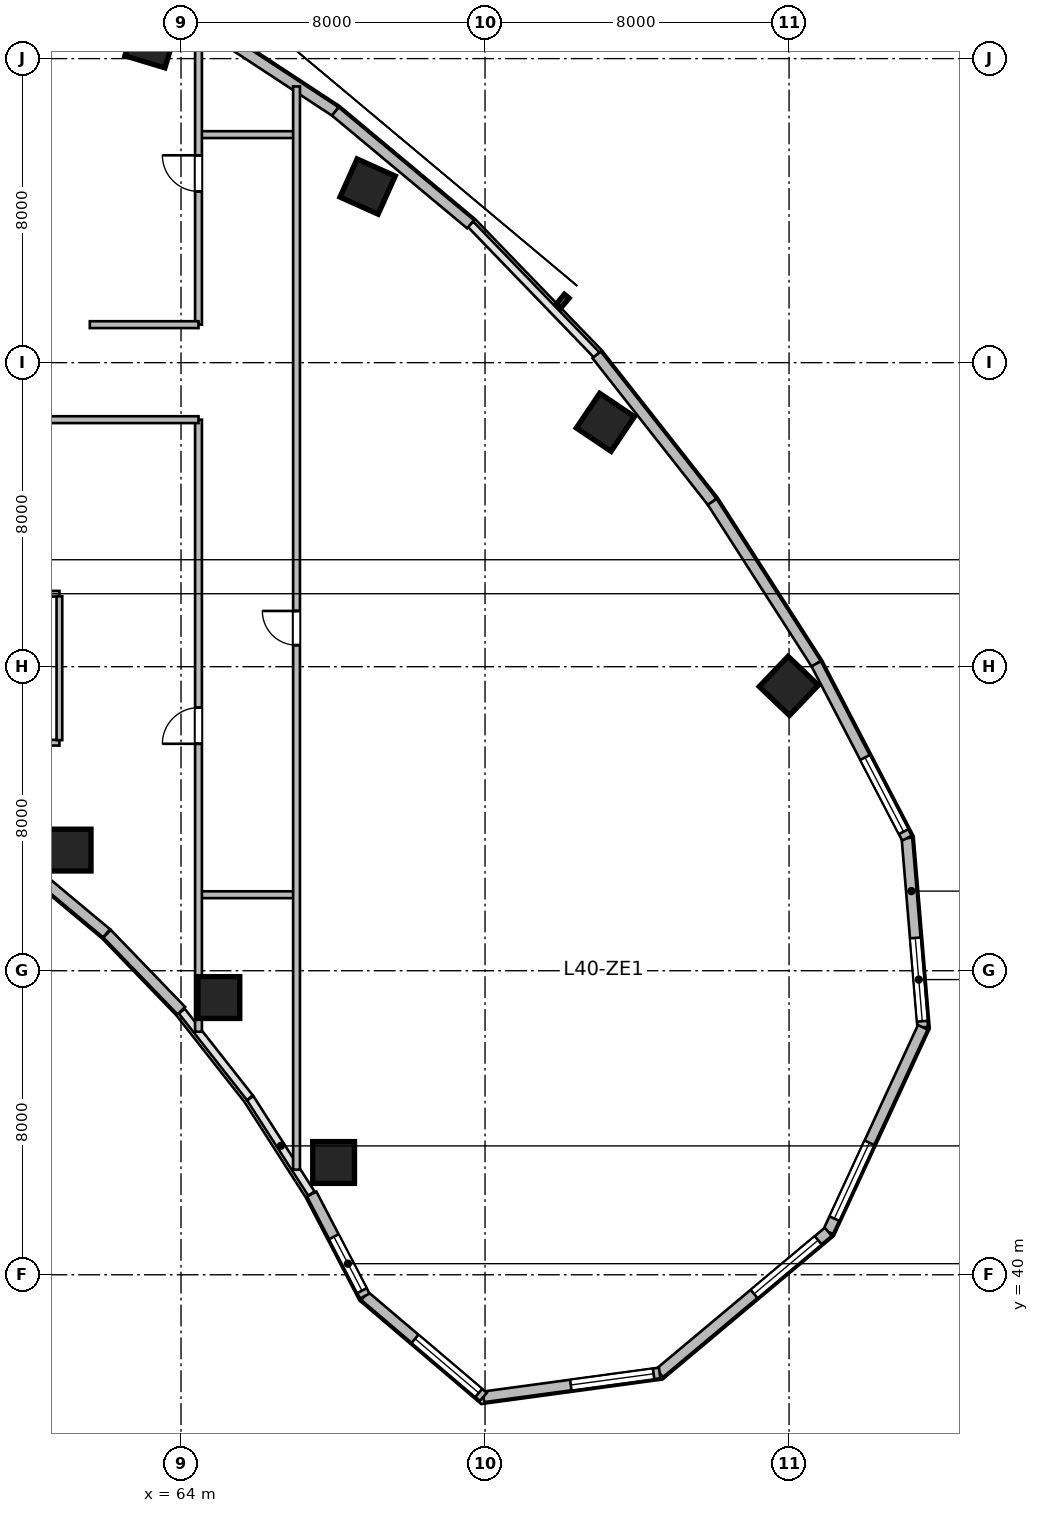
"""IFC4 building model, lengths in metres.
Left out: names, types, materials, properties, quantities, classifications, styles, units other than length and angle.
Written with IfcOpenShell. Run it as: python <this file> out.ifc"""

import sys

from ifc_helpers import new_model, si_unit, direction, frame, frame_2d, origin, origin_2d, place, context, subcontext, project, spatial, rectangle, circle, extrude, source, transform, mapped, element, fill, save


model = new_model("IFC4")
c1 = context("Model", 3, precision=1e-05, world=origin(), true_north=direction((0.0, 1.0)))
c2 = subcontext(c1, "Body", "Model", "MODEL_VIEW")
j1 = project(units=[si_unit("LENGTHUNIT", "METRE"), si_unit("PLANEANGLEUNIT", "RADIAN")], contexts=[c1])
p1 = place(None, origin())
s1 = spatial("IfcSite", under=j1, at=p1, CompositionType="ELEMENT")
p2 = place(p1, origin())
s2 = spatial("IfcBuilding", under=s1, at=p2, CompositionType="ELEMENT")
p3 = place(p2, frame((0.0, 0.0, 166.2)))
s3 = spatial("IfcBuildingStorey", under=s2, at=p3, CompositionType="ELEMENT", Elevation=166.2)
m1 = source(origin(), c2, "Body", "SweptSolid", [
    extrude(rectangle(XDim=1.1, YDim=1.1, at=origin_2d()), origin(), (0.0, 0.0, 1.0), 3.9),
])
p4 = place(p3, frame((63.209, 72.442, 0.0), z_axis=(0.0, 0.0, 1.0), x_axis=(0.288697611798, 0.957420330337, 0.0)))
e1 = element("IfcColumn", 1, at=p4, inside=s3, PredefinedType="COLUMN", context=c2, shape_type="MappedRepresentation", body=[
    mapped(m1, transform((0.0, 0.0, 0.0), scale=1.0)),
])
m2 = source(origin(), c2, "Body", "SweptSolid", [
    extrude(circle(Radius=0.55, at=origin_2d()), origin(), (0.0, 0.0, 1.0), 3.9),
])
p5 = place(p3, frame((61.082, 51.175, 0.0), z_axis=(0.0, 0.0, 1.0), x_axis=(0.409126902895, 0.912477494148, 0.0)))
e2 = element("IfcColumn", 2, at=p5, inside=s3, PredefinedType="COLUMN", context=c2, shape_type="MappedRepresentation", body=[
    mapped(m2, transform((0.0, 0.0, 0.0), scale=1.0)),
])
p6 = place(p3, frame((68.91, 68.633, 0.0), z_axis=(0.0, 0.0, 1.0), x_axis=(0.409126902895, 0.912477494148, 0.0)))
e3 = element("IfcColumn", 3, at=p6, inside=s3, PredefinedType="COLUMN", context=c2, shape_type="MappedRepresentation", body=[
    mapped(m1, transform((0.0, 0.0, 0.0), scale=1.0)),
])
p7 = place(p3, frame((64.996, 47.294, 0.0), z_axis=(0.0, 0.0, 1.0), x_axis=(0.55774510898, 0.830012285095, 0.0)))
e4 = element("IfcColumn", 4, at=p7, inside=s3, PredefinedType="COLUMN", context=c2, shape_type="MappedRepresentation", body=[
    mapped(m2, transform((0.0, 0.0, 0.0), scale=1.0)),
])
p8 = place(p3, frame((75.167, 62.43, 0.0), z_axis=(0.0, 0.0, 1.0), x_axis=(0.55774510898, 0.830012285095, 0.0)))
e5 = element("IfcColumn", 5, at=p8, inside=s3, PredefinedType="COLUMN", context=c2, shape_type="MappedRepresentation", body=[
    mapped(m1, transform((0.0, 0.0, 0.0), scale=1.0)),
])
p9 = place(p3, frame((68.015, 42.955, 0.0), z_axis=(0.0, 0.0, 1.0), x_axis=(0.690756218984, 0.723087716626, 0.0)))
e6 = element("IfcColumn", 6, at=p9, inside=s3, PredefinedType="COLUMN", context=c2, shape_type="MappedRepresentation", body=[
    mapped(m2, transform((0.0, 0.0, 0.0), scale=1.0)),
])
p10 = place(p3, frame((79.993, 55.494, 0.0), z_axis=(0.0, 0.0, 1.0), x_axis=(0.690756218984, 0.723087716626, 0.0)))
e7 = element("IfcColumn", 7, at=p10, inside=s3, PredefinedType="COLUMN", context=c2, shape_type="MappedRepresentation", body=[
    mapped(m1, transform((0.0, 0.0, 0.0), scale=1.0)),
])
m3 = source(origin(), c2, "Body", "SweptSolid", [
    extrude(rectangle(XDim=4.994, YDim=0.28, at=frame_2d((2.497, 0.0))), origin(), (0.0, 0.0, 1.0), 3.65),
])
p11 = place(p3, frame((83.102, 51.489, 0.0), z_axis=(0.0, 0.0, 1.0), x_axis=(0.083344839916, -0.996520766296, 0.0)))
e8 = element("IfcWall", 8, at=p11, inside=s3, PredefinedType="SOLIDWALL", context=c2, shape_type="MappedRepresentation", body=[
    mapped(m3, transform((0.0, 0.0, 0.0), scale=1.0)),
])
p12 = place(p11, frame((2.635, 0.0, 0.95)))
e9 = element("IfcOpeningElement", 9, at=p12, cuts=e8, PredefinedType="OPENING", context=c2, shape_type="SweptSolid", body=[
    extrude(rectangle(XDim=2.2, YDim=2.1, at=frame_2d((1.1, 1.05))), frame((0.0, 0.15, 0.0), z_axis=(0.0, -1.0, 0.0), x_axis=(1.0, 0.0, 0.0)), (0.0, 0.0, 1.0), 0.3),
])
m4 = source(origin(), c2, "Body", "SweptSolid", [
    extrude(rectangle(XDim=5.927, YDim=0.28, at=frame_2d((2.964, 0.0))), origin(), (0.0, 0.0, 1.0), 3.65),
])
p13 = place(p3, frame((83.519, 46.512, 0.0), z_axis=(0.0, 0.0, 1.0), x_axis=(-0.419656204795, -0.907683132914, 0.0)))
e10 = element("IfcWall", 10, at=p13, inside=s3, PredefinedType="SOLIDWALL", context=c2, shape_type="MappedRepresentation", body=[
    mapped(m4, transform((0.0, 0.0, 0.0), scale=1.0)),
])
p14 = place(p13, frame((3.346, 0.0, 0.95)))
e11 = element("IfcOpeningElement", 11, at=p14, cuts=e10, PredefinedType="OPENING", context=c2, shape_type="SweptSolid", body=[
    extrude(rectangle(XDim=2.2, YDim=2.1, at=frame_2d((1.1, 1.05))), frame((0.0, 0.15, 0.0), z_axis=(0.0, -1.0, 0.0), x_axis=(1.0, 0.0, 0.0)), (0.0, 0.0, 1.0), 0.3),
])
m5 = source(origin(), c2, "Body", "SweptSolid", [
    extrude(rectangle(XDim=5.786, YDim=0.28, at=frame_2d((2.893, 0.0))), origin(), (0.0, 0.0, 1.0), 3.65),
])
p15 = place(p3, frame((81.031, 41.131, 0.0), z_axis=(0.0, 0.0, 1.0), x_axis=(-0.766711306852, -0.641992034176, 0.0)))
e12 = element("IfcWall", 12, at=p15, inside=s3, PredefinedType="SOLIDWALL", context=c2, shape_type="MappedRepresentation", body=[
    mapped(m5, transform((0.0, 0.0, 0.0), scale=1.0)),
])
p16 = place(p15, frame((0.347, 0.0, 0.95)))
e13 = element("IfcOpeningElement", 13, at=p16, cuts=e12, PredefinedType="OPENING", context=c2, shape_type="SweptSolid", body=[
    extrude(rectangle(XDim=2.2, YDim=2.1, at=frame_2d((1.1, 1.05))), frame((0.0, 0.15, 0.0), z_axis=(0.0, -1.0, 0.0), x_axis=(1.0, 0.0, 0.0)), (0.0, 0.0, 1.0), 0.3),
])
m6 = source(origin(), c2, "Body", "SweptSolid", [
    extrude(rectangle(XDim=4.68, YDim=0.28, at=frame_2d((2.34, 0.0))), origin(), (0.0, 0.0, 1.0), 3.65),
])
p17 = place(p3, frame((76.594, 37.417, 0.0), z_axis=(0.0, 0.0, 1.0), x_axis=(-0.990931146435, -0.134370618162, 0.0)))
e14 = element("IfcWall", 14, at=p17, inside=s3, PredefinedType="SOLIDWALL", context=c2, shape_type="MappedRepresentation", body=[
    mapped(m6, transform((0.0, 0.0, 0.0), scale=1.0)),
])
p18 = place(p17, frame((0.16, 0.0, 0.95)))
e15 = element("IfcOpeningElement", 15, at=p18, cuts=e14, PredefinedType="OPENING", context=c2, shape_type="SweptSolid", body=[
    extrude(rectangle(XDim=2.2, YDim=2.1, at=frame_2d((1.1, 1.05))), frame((0.0, 0.15, 0.0), z_axis=(0.0, -1.0, 0.0), x_axis=(1.0, 0.0, 0.0)), (0.0, 0.0, 1.0), 0.3),
])
m7 = source(origin(), c2, "Body", "SweptSolid", [
    extrude(rectangle(XDim=4.096, YDim=0.28, at=frame_2d((2.048, 0.0))), origin(), (0.0, 0.0, 1.0), 3.65),
])
p19 = place(p3, frame((71.957, 36.788, 0.0), z_axis=(0.0, 0.0, 1.0), x_axis=(-0.761926081737, 0.647663991564, 0.0)))
e16 = element("IfcWall", 16, at=p19, inside=s3, PredefinedType="SOLIDWALL", context=c2, shape_type="MappedRepresentation", body=[
    mapped(m7, transform((0.0, 0.0, 0.0), scale=1.0)),
])
p20 = place(p19, frame((0.16, 0.0, 0.95)))
e17 = element("IfcOpeningElement", 17, at=p20, cuts=e16, PredefinedType="OPENING", context=c2, shape_type="SweptSolid", body=[
    extrude(rectangle(XDim=2.2, YDim=2.1, at=frame_2d((1.1, 1.05))), frame((0.0, 0.15, 0.0), z_axis=(0.0, -1.0, 0.0), x_axis=(1.0, 0.0, 0.0)), (0.0, 0.0, 1.0), 0.3),
])
m8 = source(origin(), c2, "Body", "SweptSolid", [
    extrude(rectangle(XDim=3.024, YDim=0.28, at=frame_2d((1.512, 0.0))), origin(), (0.0, 0.0, 1.0), 3.65),
])
p21 = place(p3, frame((68.836, 39.44, 0.0), z_axis=(0.0, 0.0, 1.0), x_axis=(-0.461718746531, 0.887026380161, 0.0)))
e18 = element("IfcWall", 18, at=p21, inside=s3, PredefinedType="SOLIDWALL", context=c2, shape_type="MappedRepresentation", body=[
    mapped(m8, transform((0.0, 0.0, 0.0), scale=1.0)),
])
p22 = place(p21, frame((0.16, 0.0, 0.95)))
e19 = element("IfcOpeningElement", 19, at=p22, cuts=e18, PredefinedType="OPENING", context=c2, shape_type="SweptSolid", body=[
    extrude(rectangle(XDim=1.6, YDim=1.9, at=frame_2d((0.8, 0.95))), frame((0.0, 0.15, 0.0), z_axis=(0.0, -1.0, 0.0), x_axis=(1.0, 0.0, 0.0)), (0.0, 0.0, 1.0), 0.3),
])
m9 = source(origin(), c2, "Body", "SweptSolid", [
    extrude(rectangle(XDim=2.812, YDim=0.28, at=frame_2d((1.406, 0.0))), origin(), (0.0, 0.0, 1.0), 3.65),
])
p23 = place(p3, frame((64.008, 46.95, 0.0), z_axis=(0.0, 0.0, 1.0), x_axis=(-0.694583668785, 0.719411931411, 0.0)))
e20 = element("IfcWall", 20, at=p23, inside=s3, PredefinedType="SOLIDWALL", context=c2, shape_type="MappedRepresentation", body=[
    mapped(m9, transform((0.0, 0.0, 0.0), scale=1.0)),
])
m10 = source(origin(), c2, "Body", "SweptSolid", [
    extrude(rectangle(XDim=2.729, YDim=0.28, at=frame_2d((1.365, 0.0))), origin(), (0.0, 0.0, 1.0), 3.65),
])
p24 = place(p3, frame((62.041, 48.987, 0.0), z_axis=(0.0, 0.0, 1.0), x_axis=(-0.767957284255, 0.640501061326, 0.0)))
e21 = element("IfcWall", 21, at=p24, inside=s3, PredefinedType="SOLIDWALL", context=c2, shape_type="MappedRepresentation", body=[
    mapped(m10, transform((0.0, 0.0, 0.0), scale=1.0)),
])
m11 = source(origin(), c2, "Body", "SweptSolid", [
    extrude(rectangle(XDim=4.501, YDim=0.28, at=frame_2d((2.25, 0.0))), origin(), (0.0, 0.0, 1.0), 3.65),
])
p25 = place(p3, frame((64.298, 73.08, 0.0), z_axis=(0.0, 0.0, 1.0), x_axis=(0.835984920737, -0.548752414391, 0.0)))
e22 = element("IfcWall", 22, at=p25, inside=s3, PredefinedType="SOLIDWALL", context=c2, shape_type="MappedRepresentation", body=[
    mapped(m11, transform((0.0, 0.0, 0.0), scale=1.0)),
])
m12 = source(origin(), c2, "Body", "SweptSolid", [
    extrude(rectangle(XDim=4.634, YDim=0.28, at=frame_2d((2.317, 0.0))), origin(), (0.0, 0.0, 1.0), 3.65),
])
p26 = place(p3, frame((68.061, 70.61, 0.0), z_axis=(0.0, 0.0, 1.0), x_axis=(0.767910229096, -0.640557475993, 0.0)))
e23 = element("IfcWall", 23, at=p26, inside=s3, PredefinedType="SOLIDWALL", context=c2, shape_type="MappedRepresentation", body=[
    mapped(m12, transform((0.0, 0.0, 0.0), scale=1.0)),
])
m13 = source(origin(), c2, "Body", "SweptSolid", [
    extrude(rectangle(XDim=4.922, YDim=0.28, at=frame_2d((2.461, 0.0))), origin(), (0.0, 0.0, 1.0), 3.65),
])
p27 = place(p3, frame((74.936, 64.206, 0.0), z_axis=(0.0, 0.0, 1.0), x_axis=(0.61817639101, -0.786039407153, 0.0)))
e24 = element("IfcWall", 24, at=p27, inside=s3, PredefinedType="SOLIDWALL", context=c2, shape_type="MappedRepresentation", body=[
    mapped(m13, transform((0.0, 0.0, 0.0), scale=1.0)),
])
m14 = source(origin(), c2, "Body", "SweptSolid", [
    extrude(rectangle(XDim=5.065, YDim=0.28, at=frame_2d((2.532, 0.0))), origin(), (0.0, 0.0, 1.0), 3.65),
])
p28 = place(p3, frame((77.979, 60.338, 0.0), z_axis=(0.0, 0.0, 1.0), x_axis=(0.540177618806, -0.841551032404, 0.0)))
e25 = element("IfcWall", 25, at=p28, inside=s3, PredefinedType="SOLIDWALL", context=c2, shape_type="MappedRepresentation", body=[
    mapped(m14, transform((0.0, 0.0, 0.0), scale=1.0)),
])
m15 = source(origin(), c2, "Body", "SweptSolid", [
    extrude(rectangle(XDim=5.171, YDim=0.28, at=frame_2d((2.585, 0.0))), origin(), (0.0, 0.0, 1.0), 3.65),
])
p29 = place(p3, frame((80.715, 56.075, 0.0), z_axis=(0.0, 0.0, 1.0), x_axis=(0.461752581363, -0.887008767491, 0.0)))
e26 = element("IfcWall", 26, at=p29, inside=s3, PredefinedType="SOLIDWALL", context=c2, shape_type="MappedRepresentation", body=[
    mapped(m15, transform((0.0, 0.0, 0.0), scale=1.0)),
])
p30 = place(p29, frame((2.778, 0.0, 0.95)))
e27 = element("IfcOpeningElement", 27, at=p30, cuts=e26, PredefinedType="OPENING", context=c2, shape_type="SweptSolid", body=[
    extrude(rectangle(XDim=2.2, YDim=2.1, at=frame_2d((1.1, 1.05))), frame((0.0, 0.15, 0.0), z_axis=(0.0, -1.0, 0.0), x_axis=(1.0, 0.0, 0.0)), (0.0, 0.0, 1.0), 0.3),
])
m16 = source(origin(), c2, "Body", "SweptSolid", [
    extrude(rectangle(XDim=6.6, YDim=0.15, at=frame_2d((3.3, 0.0))), origin(), (0.0, 0.0, 1.0), 3.095),
])
p31 = place(p3, frame((54.2, 54.0, 0.0), z_axis=(0.0, 0.0, 1.0), x_axis=(1.0, 0.0, 0.0)))
e28 = element("IfcWall", 28, at=p31, inside=s3, PredefinedType="PARTITIONING", context=c2, shape_type="MappedRepresentation", body=[
    mapped(m16, transform((0.0, 0.0, 0.0), scale=1.0)),
])
m17 = source(origin(), c2, "Body", "SweptSolid", [
    extrude(rectangle(XDim=6.6, YDim=0.15, at=frame_2d((3.3, 0.0))), origin(), (0.0, 0.0, 1.0), 3.65),
])
p32 = place(p3, frame((54.2, 57.92, 0.0), z_axis=(0.0, 0.0, 1.0), x_axis=(1.0, 0.0, 0.0)))
e29 = element("IfcWall", 29, at=p32, inside=s3, PredefinedType="PARTITIONING", context=c2, shape_type="MappedRepresentation", body=[
    mapped(m17, transform((0.0, 0.0, 0.0), scale=1.0)),
])
p33 = place(p32, frame((2.825, 0.0, 0.0)))
e30 = element("IfcOpeningElement", 30, at=p33, cuts=e29, PredefinedType="OPENING", context=c2, shape_type="SweptSolid", body=[
    extrude(rectangle(XDim=0.95, YDim=2.1, at=frame_2d((0.475, 1.05))), frame((0.0, 0.085, 0.0), z_axis=(0.0, -1.0, 0.0), x_axis=(1.0, 0.0, 0.0)), (0.0, 0.0, 1.0), 0.17),
])
m18 = source(origin(), c2, "Body", "SweptSolid", [
    extrude(rectangle(XDim=3.785, YDim=0.15, at=frame_2d((1.893, 0.0))), origin(), (0.0, 0.0, 1.0), 3.65),
])
p34 = place(p3, frame((60.8, 54.067, 0.0), z_axis=(0.0, 0.0, 1.0), x_axis=(0.0, 1.0, 0.0)))
e31 = element("IfcWall", 31, at=p34, inside=s3, PredefinedType="PARTITIONING", context=c2, shape_type="MappedRepresentation", body=[
    mapped(m18, transform((0.0, 0.0, 0.0), scale=1.0)),
])
m19 = source(origin(), c2, "Body", "SweptSolid", [
    extrude(rectangle(XDim=2.5, YDim=0.18, at=frame_2d((1.25, 0.0))), origin(), (0.0, 0.0, 1.0), 3.65),
])
p35 = place(p3, frame((64.5, 50.0, 0.0), z_axis=(0.0, 0.0, 1.0), x_axis=(1.0, 0.0, 0.0)))
e32 = element("IfcWall", 32, at=p35, inside=s3, PredefinedType="PLUMBINGWALL", context=c2, shape_type="MappedRepresentation", body=[
    mapped(m19, transform((0.0, 0.0, 0.0), scale=1.0)),
])
m20 = source(origin(), c2, "Body", "SweptSolid", [
    extrude(rectangle(XDim=2.5, YDim=0.18, at=frame_2d((1.25, 0.0))), origin(), (0.0, 0.0, 1.0), 3.022),
])
p36 = place(p3, frame((64.5, 70.0, 0.0), z_axis=(0.0, 0.0, 1.0), x_axis=(1.0, 0.0, 0.0)))
e33 = element("IfcWall", 33, at=p36, inside=s3, PredefinedType="PLUMBINGWALL", context=c2, shape_type="MappedRepresentation", body=[
    mapped(m20, transform((0.0, 0.0, 0.0), scale=1.0)),
])
m21 = source(origin(), c2, "Body", "SweptSolid", [
    extrude(rectangle(XDim=28.503, YDim=0.18, at=frame_2d((14.251, 0.0))), origin(), (0.0, 0.0, 1.0), 2.942),
])
p37 = place(p3, frame((67.04, 42.765, 0.0), z_axis=(0.0, 0.0, 1.0), x_axis=(0.0, 1.0, 0.0)))
e34 = element("IfcWall", 34, at=p37, inside=s3, PredefinedType="PLUMBINGWALL", context=c2, shape_type="MappedRepresentation", body=[
    mapped(m21, transform((0.0, 0.0, 0.0), scale=1.0)),
])
p38 = place(p37, frame((13.802, 0.0, 0.0)))
e35 = element("IfcOpeningElement", 35, at=p38, cuts=e34, PredefinedType="OPENING", context=c2, shape_type="SweptSolid", body=[
    extrude(rectangle(XDim=0.9, YDim=2.08, at=frame_2d((0.45, 1.04))), frame((0.0, 0.1, 0.0), z_axis=(0.0, -1.0, 0.0), x_axis=(1.0, 0.0, 0.0)), (0.0, 0.0, 1.0), 0.2),
])
m22 = source(origin(), c2, "Body", "SweptSolid", [
    extrude(rectangle(XDim=16.106, YDim=0.18, at=frame_2d((8.053, 0.0))), origin(), (0.0, 0.0, 1.0), 2.942),
])
p39 = place(p3, frame((64.46, 46.394, 0.0), z_axis=(0.0, 0.0, 1.0), x_axis=(0.0, 1.0, 0.0)))
e36 = element("IfcWall", 36, at=p39, inside=s3, PredefinedType="PLUMBINGWALL", context=c2, shape_type="MappedRepresentation", body=[
    mapped(m22, transform((0.0, 0.0, 0.0), scale=1.0)),
])
p40 = place(p39, frame((7.578, 0.0, 0.0)))
e37 = element("IfcOpeningElement", 37, at=p40, cuts=e36, PredefinedType="OPENING", context=c2, shape_type="SweptSolid", body=[
    extrude(rectangle(XDim=0.95, YDim=2.1, at=frame_2d((0.475, 1.05))), frame((0.0, 0.1, 0.0), z_axis=(0.0, -1.0, 0.0), x_axis=(1.0, 0.0, 0.0)), (0.0, 0.0, 1.0), 0.2),
])
m23 = source(origin(), c2, "Body", "SweptSolid", [
    extrude(rectangle(XDim=4.96, YDim=0.18, at=frame_2d((2.48, 0.0))), origin(), (0.0, 0.0, 1.0), 3.65),
])
p41 = place(p3, frame((59.5, 62.5, 0.0), z_axis=(0.0, 0.0, 1.0), x_axis=(1.0, 0.0, 0.0)))
e38 = element("IfcWall", 38, at=p41, inside=s3, PredefinedType="PLUMBINGWALL", context=c2, shape_type="MappedRepresentation", body=[
    mapped(m23, transform((0.0, 0.0, 0.0), scale=1.0)),
])
m24 = source(origin(), c2, "Body", "SweptSolid", [
    extrude(rectangle(XDim=7.962, YDim=0.18, at=frame_2d((3.981, 0.0))), origin(), (0.0, 0.0, 1.0), 3.65),
])
p42 = place(p3, frame((64.46, 65.0, 0.0), z_axis=(0.0, 0.0, 1.0), x_axis=(0.0, 1.0, 0.0)))
e39 = element("IfcWall", 39, at=p42, inside=s3, PredefinedType="PLUMBINGWALL", context=c2, shape_type="MappedRepresentation", body=[
    mapped(m24, transform((0.0, 0.0, 0.0), scale=1.0)),
])
p43 = place(p42, frame((3.506, 0.0, 0.0)))
e40 = element("IfcOpeningElement", 40, at=p43, cuts=e39, PredefinedType="OPENING", context=c2, shape_type="SweptSolid", body=[
    extrude(rectangle(XDim=0.95, YDim=2.1, at=frame_2d((0.475, 1.05))), frame((0.0, 0.1, 0.0), z_axis=(0.0, -1.0, 0.0), x_axis=(1.0, 0.0, 0.0)), (0.0, 0.0, 1.0), 0.2),
])
m25 = source(origin(), c2, "Body", "SweptSolid", [
    extrude(rectangle(XDim=2.86, YDim=0.18, at=frame_2d((1.43, 0.0))), origin(), (0.0, 0.0, 1.0), 3.65),
])
p44 = place(p3, frame((61.6, 65.0, 0.0), z_axis=(0.0, 0.0, 1.0), x_axis=(1.0, 0.0, 0.0)))
e41 = element("IfcWall", 41, at=p44, inside=s3, PredefinedType="PLUMBINGWALL", context=c2, shape_type="MappedRepresentation", body=[
    mapped(m25, transform((0.0, 0.0, 0.0), scale=1.0)),
])
m26 = source(origin(), c2, "Body", "SweptSolid", [
    extrude(rectangle(XDim=2.2, YDim=2.1, at=frame_2d((1.1, 1.05))), frame((0.0, 0.03, 0.0), z_axis=(0.0, -1.0, 0.0), x_axis=(1.0, 0.0, 0.0)), (0.0, 0.0, 1.0), 0.06),
])
p45 = place(p12, origin())
e42 = element("IfcWindow", 42, at=p45, inside=s3, PartitioningType="TRIPLE_PANEL_VERTICAL", PredefinedType="WINDOW", context=c2, shape_type="MappedRepresentation", body=[
    mapped(m26, transform((0.0, 0.0, 0.0), scale=1.0)),
])
fill(e9, e42)
p46 = place(p14, origin())
e43 = element("IfcWindow", 43, at=p46, inside=s3, PartitioningType="TRIPLE_PANEL_VERTICAL", PredefinedType="WINDOW", context=c2, shape_type="MappedRepresentation", body=[
    mapped(m26, transform((0.0, 0.0, 0.0), scale=1.0)),
])
fill(e11, e43)
p47 = place(p16, origin())
e44 = element("IfcWindow", 44, at=p47, inside=s3, PartitioningType="TRIPLE_PANEL_VERTICAL", PredefinedType="WINDOW", context=c2, shape_type="MappedRepresentation", body=[
    mapped(m26, transform((0.0, 0.0, 0.0), scale=1.0)),
])
fill(e13, e44)
p48 = place(p18, origin())
e45 = element("IfcWindow", 45, at=p48, inside=s3, PartitioningType="TRIPLE_PANEL_VERTICAL", PredefinedType="WINDOW", context=c2, shape_type="MappedRepresentation", body=[
    mapped(m26, transform((0.0, 0.0, 0.0), scale=1.0)),
])
fill(e15, e45)
p49 = place(p20, origin())
e46 = element("IfcWindow", 46, at=p49, inside=s3, PartitioningType="TRIPLE_PANEL_VERTICAL", PredefinedType="WINDOW", context=c2, shape_type="MappedRepresentation", body=[
    mapped(m26, transform((0.0, 0.0, 0.0), scale=1.0)),
])
fill(e17, e46)
m27 = source(origin(), c2, "Body", "SweptSolid", [
    extrude(rectangle(XDim=1.6, YDim=1.9, at=frame_2d((0.8, 0.95))), frame((0.0, 0.03, 0.0), z_axis=(0.0, -1.0, 0.0), x_axis=(1.0, 0.0, 0.0)), (0.0, 0.0, 1.0), 0.06),
])
p50 = place(p22, origin())
e47 = element("IfcWindow", 47, at=p50, inside=s3, PartitioningType="SINGLE_PANEL", PredefinedType="WINDOW", context=c2, shape_type="MappedRepresentation", body=[
    mapped(m27, transform((0.0, 0.0, 0.0), scale=1.0)),
])
fill(e19, e47)
p51 = place(p30, origin())
e48 = element("IfcWindow", 48, at=p51, inside=s3, PartitioningType="TRIPLE_PANEL_VERTICAL", PredefinedType="WINDOW", context=c2, shape_type="MappedRepresentation", body=[
    mapped(m26, transform((0.0, 0.0, 0.0), scale=1.0)),
])
fill(e27, e48)
m28 = source(origin(), c2, "Body", "SweptSolid", [
    extrude(rectangle(XDim=0.9, YDim=2.08, at=frame_2d((0.45, 1.04))), frame((0.0, 0.025, 0.0), z_axis=(0.0, -1.0, 0.0), x_axis=(1.0, 0.0, 0.0)), (0.0, 0.0, 1.0), 0.05),
])
p52 = place(p38, origin())
e49 = element("IfcDoor", 49, at=p52, inside=s3, OperationType="SINGLE_SWING_RIGHT", PredefinedType="DOOR", context=c2, shape_type="MappedRepresentation", body=[
    mapped(m28, transform((0.0, 0.0, 0.0), scale=1.0)),
])
fill(e35, e49)
m29 = source(origin(), c2, "Body", "SweptSolid", [
    extrude(rectangle(XDim=0.95, YDim=2.1, at=frame_2d((0.475, 1.05))), frame((0.0, 0.025, 0.0), z_axis=(0.0, -1.0, 0.0), x_axis=(1.0, 0.0, 0.0)), (0.0, 0.0, 1.0), 0.05),
])
p53 = place(p40, origin())
e50 = element("IfcDoor", 50, at=p53, inside=s3, OperationType="SINGLE_SWING_LEFT", PredefinedType="DOOR", context=c2, shape_type="MappedRepresentation", body=[
    mapped(m29, transform((0.0, 0.0, 0.0), scale=1.0)),
])
fill(e37, e50)
p54 = place(p43, origin())
e51 = element("IfcDoor", 51, at=p54, inside=s3, OperationType="SINGLE_SWING_RIGHT", PredefinedType="DOOR", context=c2, shape_type="MappedRepresentation", body=[
    mapped(m29, transform((0.0, 0.0, 0.0), scale=1.0)),
])
fill(e40, e51)
save(model, sys.argv[1])
